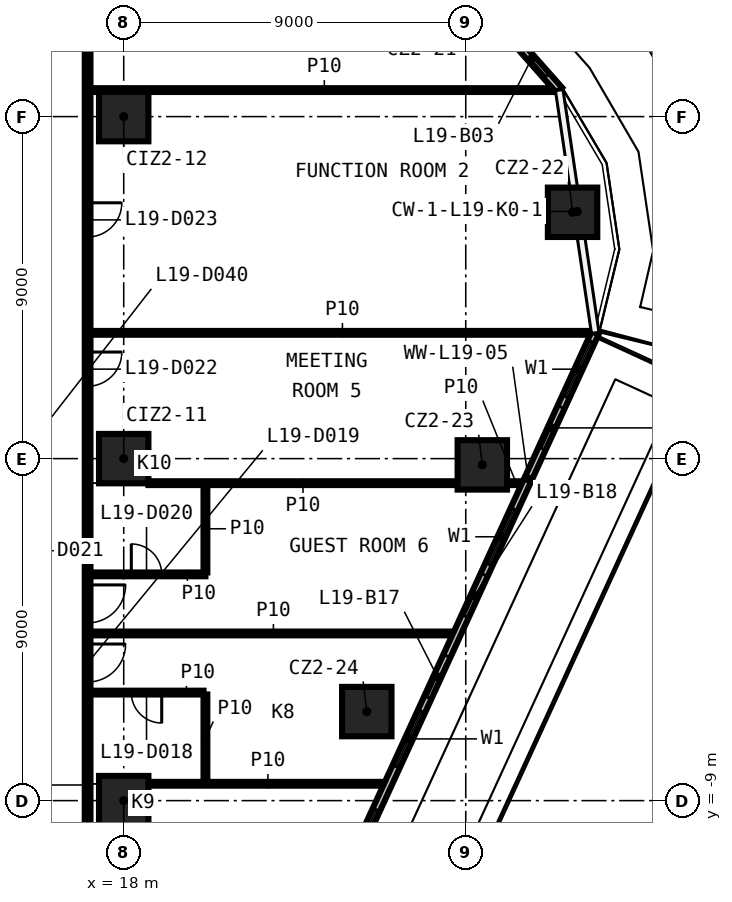
"""IFC4 building model, lengths in metres.
Left out: names, types, materials, properties, quantities, classifications, styles, units other than length and angle.
Written with IfcOpenShell. Run it as: python <this file> out.ifc"""

import sys

from ifc_helpers import new_model, si_unit, direction, frame, frame_2d, origin, origin_2d, place, context, subcontext, project, spatial, rectangle, extrude, element, fill, save


model = new_model("IFC4")
c1 = context("Model", 3, precision=1e-05, world=origin(), true_north=direction((0.0, 1.0)))
c2 = subcontext(c1, "Body", "Model", "MODEL_VIEW")
j1 = project(units=[si_unit("LENGTHUNIT", "METRE"), si_unit("PLANEANGLEUNIT", "RADIAN")], contexts=[c1])
p1 = place(None, origin())
s1 = spatial("IfcSite", under=j1, at=p1, CompositionType="ELEMENT")
p2 = place(p1, origin())
s2 = spatial("IfcBuilding", under=s1, at=p2, CompositionType="ELEMENT")
p3 = place(p2, frame((0.0, 0.0, 95.2)))
s3 = spatial("IfcBuildingStorey", under=s2, at=p3, CompositionType="ELEMENT", Elevation=95.2)
for number, where, z_axis, x_axis in (
    (1, (29.811, 6.482, 0.0), (0.0, 0.0, 1.0), (1.0, 0.0, 0.0)),
    (2, (27.436, -0.165, 0.0), (0.0, 0.0, 1.0), (1.0, 0.0, 0.0)),
    (3, (24.396, -6.657, 0.0), (0.0, 0.0, 1.0), (1.0, 0.0, 0.0)),
    (4, (18.0, -9.0, 0.0), (0.0, 0.0, 1.0), (1.0, 0.0, 0.0)),
    (5, (18.0, 0.0, 0.0), (0.0, 0.0, 1.0), (1.0, 0.0, 0.0)),
    (6, (18.0, 9.0, 0.0), (0.0, 0.0, 1.0), (1.0, 0.0, 0.0)),
):
    element("IfcColumn", number, at=place(p3, frame(where, z_axis=z_axis, x_axis=x_axis)), inside=s3, PredefinedType="COLUMN", context=c2, shape_type="SweptSolid", body=[
        extrude(rectangle(XDim=1.3, YDim=1.3, at=origin_2d()), origin(), (0.0, 0.0, 1.0), 3.25),
    ])
p4 = place(p3, frame((18.65, -8.557, 0.0), z_axis=(0.0, 0.0, 1.0), x_axis=(1.0, 0.0, 0.0)))
e7 = element("IfcWall", 7, at=p4, inside=s3, PredefinedType="PARTITIONING", context=c2, shape_type="SweptSolid", body=[
    extrude(rectangle(XDim=6.288, YDim=0.1, at=frame_2d((3.144, 0.0))), origin(), (0.0, 0.0, 1.0), 3.25),
])
p5 = place(p3, frame((20.1, -6.157, 0.0), z_axis=(0.0, 0.0, 1.0), x_axis=(-1.0, 0.0, 0.0)))
e8 = element("IfcWall", 8, at=p5, inside=s3, PredefinedType="PARTITIONING", context=c2, shape_type="SweptSolid", body=[
    extrude(rectangle(XDim=2.975, YDim=0.1, at=frame_2d((1.488, 0.0))), origin(), (0.0, 0.0, 1.0), 3.25),
])
p6 = place(p5, frame((1.1, 0.0, 0.0)))
e9 = element("IfcOpeningElement", 9, at=p6, cuts=e8, PredefinedType="OPENING", context=c2, shape_type="SweptSolid", body=[
    extrude(rectangle(XDim=0.8, YDim=2.1, at=frame_2d((0.4, 1.05))), frame((0.0, 0.06, 0.0), z_axis=(0.0, -1.0, 0.0), x_axis=(1.0, 0.0, 0.0)), (0.0, 0.0, 1.0), 0.12),
])
p7 = place(p3, frame((17.125, -4.601, 0.0), z_axis=(0.0, 0.0, 1.0), x_axis=(1.0, 0.0, 0.0)))
e10 = element("IfcWall", 10, at=p7, inside=s3, PredefinedType="PARTITIONING", context=c2, shape_type="SweptSolid", body=[
    extrude(rectangle(XDim=9.629, YDim=0.1, at=frame_2d((4.814, 0.0))), origin(), (0.0, 0.0, 1.0), 3.25),
])
p8 = place(p3, frame((17.125, -3.046, 0.0), z_axis=(0.0, 0.0, 1.0), x_axis=(1.0, 0.0, 0.0)))
e11 = element("IfcWall", 11, at=p8, inside=s3, PredefinedType="PARTITIONING", context=c2, shape_type="SweptSolid", body=[
    extrude(rectangle(XDim=3.025, YDim=0.1, at=frame_2d((1.512, 0.0))), origin(), (0.0, 0.0, 1.0), 3.25),
])
p9 = place(p8, frame((1.075, 0.0, 0.0)))
e12 = element("IfcOpeningElement", 12, at=p9, cuts=e11, PredefinedType="OPENING", context=c2, shape_type="SweptSolid", body=[
    extrude(rectangle(XDim=0.8, YDim=2.1, at=frame_2d((0.4, 1.05))), frame((0.0, 0.06, 0.0), z_axis=(0.0, -1.0, 0.0), x_axis=(1.0, 0.0, 0.0)), (0.0, 0.0, 1.0), 0.12),
])
p10 = place(p3, frame((18.65, -0.646, 0.0), z_axis=(0.0, 0.0, 1.0), x_axis=(1.0, 0.0, 0.0)))
e13 = element("IfcWall", 13, at=p10, inside=s3, PredefinedType="PARTITIONING", context=c2, shape_type="SweptSolid", body=[
    extrude(rectangle(XDim=8.136, YDim=0.1, at=frame_2d((4.068, 0.0))), origin(), (0.0, 0.0, 1.0), 3.25),
])
p11 = place(p3, frame((28.086, -0.646, 0.0), z_axis=(0.0, 0.0, 1.0), x_axis=(1.0, 0.0, 0.0)))
e14 = element("IfcWall", 14, at=p11, inside=s3, PredefinedType="PARTITIONING", context=c2, shape_type="SweptSolid", body=[
    extrude(rectangle(XDim=0.483, YDim=0.1, at=frame_2d((0.242, 0.0))), origin(), (0.0, 0.0, 1.0), 3.25),
])
p12 = place(p3, frame((17.125, 3.31, 0.0), z_axis=(0.0, 0.0, 1.0), x_axis=(1.0, 0.0, 0.0)))
e15 = element("IfcWall", 15, at=p12, inside=s3, PredefinedType="PARTITIONING", context=c2, shape_type="SweptSolid", body=[
    extrude(rectangle(XDim=13.26, YDim=0.1, at=frame_2d((6.63, 0.0))), origin(), (0.0, 0.0, 1.0), 3.25),
])
p13 = place(p3, frame((17.125, 9.698, 0.0), z_axis=(0.0, 0.0, 1.0), x_axis=(1.0, 0.0, 0.0)))
e16 = element("IfcWall", 16, at=p13, inside=s3, PredefinedType="PARTITIONING", context=c2, shape_type="SweptSolid", body=[
    extrude(rectangle(XDim=12.308, YDim=0.1, at=frame_2d((6.154, 0.0))), origin(), (0.0, 0.0, 1.0), 3.25),
])
p14 = place(p3, frame((20.15, -8.507, 0.0), z_axis=(0.0, 0.0, 1.0), x_axis=(0.0, 1.0, 0.0)))
e17 = element("IfcWall", 17, at=p14, inside=s3, PredefinedType="PARTITIONING", context=c2, shape_type="SweptSolid", body=[
    extrude(rectangle(XDim=2.3, YDim=0.1, at=frame_2d((1.15, 0.0))), origin(), (0.0, 0.0, 1.0), 3.25),
])
p15 = place(p3, frame((20.15, -2.996, 0.0), z_axis=(0.0, 0.0, 1.0), x_axis=(0.0, 1.0, 0.0)))
e18 = element("IfcWall", 18, at=p15, inside=s3, PredefinedType="PARTITIONING", context=c2, shape_type="SweptSolid", body=[
    extrude(rectangle(XDim=2.3, YDim=0.1, at=frame_2d((1.15, 0.0))), origin(), (0.0, 0.0, 1.0), 3.25),
])
p16 = place(p3, frame((17.05, 13.975, 0.0), z_axis=(0.0, 0.0, 1.0), x_axis=(0.0, -1.0, 0.0)))
e19 = element("IfcWall", 19, at=p16, inside=s3, PredefinedType="PARTITIONING", context=c2, shape_type="SweptSolid", body=[
    extrude(rectangle(XDim=27.95, YDim=0.15, at=frame_2d((13.975, 0.0))), origin(), (0.0, 0.0, 1.0), 3.25),
])
p17 = place(p16, frame((25.274, 0.0, 0.0)))
e20 = element("IfcOpeningElement", 20, at=p17, cuts=e19, PredefinedType="OPENING", context=c2, shape_type="SweptSolid", body=[
    extrude(rectangle(XDim=0.9, YDim=2.1, at=frame_2d((0.45, 1.05))), frame((0.0, 0.085, 0.0), z_axis=(0.0, -1.0, 0.0), x_axis=(1.0, 0.0, 0.0)), (0.0, 0.0, 1.0), 0.17),
])
p18 = place(p16, frame((18.854, 0.0, 0.0)))
e21 = element("IfcOpeningElement", 21, at=p18, cuts=e19, PredefinedType="OPENING", context=c2, shape_type="SweptSolid", body=[
    extrude(rectangle(XDim=1.0, YDim=2.1, at=frame_2d((0.5, 1.05))), frame((0.0, 0.085, 0.0), z_axis=(0.0, -1.0, 0.0), x_axis=(1.0, 0.0, 0.0)), (0.0, 0.0, 1.0), 0.17),
])
p19 = place(p16, frame((17.299, 0.0, 0.0)))
e22 = element("IfcOpeningElement", 22, at=p19, cuts=e19, PredefinedType="OPENING", context=c2, shape_type="SweptSolid", body=[
    extrude(rectangle(XDim=1.0, YDim=2.1, at=frame_2d((0.5, 1.05))), frame((0.0, 0.085, 0.0), z_axis=(0.0, -1.0, 0.0), x_axis=(1.0, 0.0, 0.0)), (0.0, 0.0, 1.0), 0.17),
])
p20 = place(p16, frame((11.171, 0.0, 0.0)))
e23 = element("IfcOpeningElement", 23, at=p20, cuts=e19, PredefinedType="OPENING", context=c2, shape_type="SweptSolid", body=[
    extrude(rectangle(XDim=0.9, YDim=2.1, at=frame_2d((0.45, 1.05))), frame((0.0, 0.085, 0.0), z_axis=(0.0, -1.0, 0.0), x_axis=(1.0, 0.0, 0.0)), (0.0, 0.0, 1.0), 0.17),
])
p21 = place(p16, frame((7.243, 0.0, 0.0)))
e24 = element("IfcOpeningElement", 24, at=p21, cuts=e19, PredefinedType="OPENING", context=c2, shape_type="SweptSolid", body=[
    extrude(rectangle(XDim=0.9, YDim=2.1, at=frame_2d((0.45, 1.05))), frame((0.0, 0.085, 0.0), z_axis=(0.0, -1.0, 0.0), x_axis=(1.0, 0.0, 0.0)), (0.0, 0.0, 1.0), 0.17),
])
p22 = place(p16, frame((2.153, 0.0, 0.0)))
e25 = element("IfcOpeningElement", 25, at=p22, cuts=e19, PredefinedType="OPENING", context=c2, shape_type="SweptSolid", body=[
    extrude(rectangle(XDim=0.9, YDim=2.1, at=frame_2d((0.45, 1.05))), frame((0.0, 0.085, 0.0), z_axis=(0.0, -1.0, 0.0), x_axis=(1.0, 0.0, 0.0)), (0.0, 0.0, 1.0), 0.17),
])
p23 = place(p3, frame((29.46, 9.698, 0.0), z_axis=(0.0, 0.0, 1.0), x_axis=(-0.662868291848, 0.748736020011, 0.0)))
e26 = element("IfcWall", 26, at=p23, inside=s3, PredefinedType="SOLIDWALL", context=c2, shape_type="SweptSolid", body=[
    extrude(rectangle(XDim=4.472, YDim=0.2, at=frame_2d((2.236, 0.0))), origin(), (0.0, 0.0, 1.0), 3.25),
])
p24 = place(p23, frame((2.0, 0.0, 0.6)))
e27 = element("IfcOpeningElement", 27, at=p24, cuts=e26, PredefinedType="OPENING", context=c2, shape_type="SweptSolid", body=[
    extrude(rectangle(XDim=1.6, YDim=2.4, at=frame_2d((0.8, 1.2))), frame((0.0, 0.11, 0.0), z_axis=(0.0, -1.0, 0.0), x_axis=(1.0, 0.0, 0.0)), (0.0, 0.0, 1.0), 0.22),
])
p25 = place(p23, frame((0.5, 0.0, 0.0)))
e28 = element("IfcOpeningElement", 28, at=p25, cuts=e26, PredefinedType="OPENING", context=c2, shape_type="SweptSolid", body=[
    extrude(rectangle(XDim=1.2, YDim=2.4, at=frame_2d((0.6, 1.2))), frame((0.0, 0.11, 0.0), z_axis=(0.0, -1.0, 0.0), x_axis=(1.0, 0.0, 0.0)), (0.0, 0.0, 1.0), 0.22),
])
p26 = place(p3, frame((21.329, -16.468, 0.0), z_axis=(0.0, 0.0, 1.0), x_axis=(0.417117833448, 0.908852415423, 0.0)))
e29 = element("IfcWall", 29, at=p26, inside=s3, PredefinedType="SOLIDWALL", context=c2, shape_type="SweptSolid", body=[
    extrude(rectangle(XDim=21.761, YDim=0.2, at=frame_2d((10.881, 0.0))), origin(), (0.0, 0.0, 1.0), 3.25),
])
p27 = place(p26, frame((2.0, 0.0, 0.6)))
e30 = element("IfcOpeningElement", 30, at=p27, cuts=e29, PredefinedType="OPENING", context=c2, shape_type="SweptSolid", body=[
    extrude(rectangle(XDim=1.6, YDim=2.4, at=frame_2d((0.8, 1.2))), frame((0.0, 0.11, 0.0), z_axis=(0.0, -1.0, 0.0), x_axis=(1.0, 0.0, 0.0)), (0.0, 0.0, 1.0), 0.22),
])
p28 = place(p26, frame((0.5, 0.0, 0.0)))
e31 = element("IfcOpeningElement", 31, at=p28, cuts=e29, PredefinedType="OPENING", context=c2, shape_type="SweptSolid", body=[
    extrude(rectangle(XDim=1.2, YDim=2.4, at=frame_2d((0.6, 1.2))), frame((0.0, 0.11, 0.0), z_axis=(0.0, -1.0, 0.0), x_axis=(1.0, 0.0, 0.0)), (0.0, 0.0, 1.0), 0.22),
])
p29 = place(p26, frame((6.352, 0.0, 0.6)))
e32 = element("IfcOpeningElement", 32, at=p29, cuts=e29, PredefinedType="OPENING", context=c2, shape_type="SweptSolid", body=[
    extrude(rectangle(XDim=1.6, YDim=2.4, at=frame_2d((0.8, 1.2))), frame((0.0, 0.11, 0.0), z_axis=(0.0, -1.0, 0.0), x_axis=(1.0, 0.0, 0.0)), (0.0, 0.0, 1.0), 0.22),
])
p30 = place(p26, frame((4.852, 0.0, 0.0)))
e33 = element("IfcOpeningElement", 33, at=p30, cuts=e29, PredefinedType="OPENING", context=c2, shape_type="SweptSolid", body=[
    extrude(rectangle(XDim=1.2, YDim=2.4, at=frame_2d((0.6, 1.2))), frame((0.0, 0.11, 0.0), z_axis=(0.0, -1.0, 0.0), x_axis=(1.0, 0.0, 0.0)), (0.0, 0.0, 1.0), 0.22),
])
p31 = place(p26, frame((9.205, 0.0, 0.6)))
e34 = element("IfcOpeningElement", 34, at=p31, cuts=e29, PredefinedType="OPENING", context=c2, shape_type="SweptSolid", body=[
    extrude(rectangle(XDim=1.6, YDim=2.4, at=frame_2d((0.8, 1.2))), frame((0.0, 0.11, 0.0), z_axis=(0.0, -1.0, 0.0), x_axis=(1.0, 0.0, 0.0)), (0.0, 0.0, 1.0), 0.22),
])
p32 = place(p26, frame((11.205, 0.0, 0.0)))
e35 = element("IfcOpeningElement", 35, at=p32, cuts=e29, PredefinedType="OPENING", context=c2, shape_type="SweptSolid", body=[
    extrude(rectangle(XDim=1.2, YDim=2.4, at=frame_2d((0.6, 1.2))), frame((0.0, 0.11, 0.0), z_axis=(0.0, -1.0, 0.0), x_axis=(1.0, 0.0, 0.0)), (0.0, 0.0, 1.0), 0.22),
])
p33 = place(p26, frame((15.057, 0.0, 0.6)))
e36 = element("IfcOpeningElement", 36, at=p33, cuts=e29, PredefinedType="OPENING", context=c2, shape_type="SweptSolid", body=[
    extrude(rectangle(XDim=1.6, YDim=2.4, at=frame_2d((0.8, 1.2))), frame((0.0, 0.11, 0.0), z_axis=(0.0, -1.0, 0.0), x_axis=(1.0, 0.0, 0.0)), (0.0, 0.0, 1.0), 0.22),
])
p34 = place(p26, frame((13.557, 0.0, 0.0)))
e37 = element("IfcOpeningElement", 37, at=p34, cuts=e29, PredefinedType="OPENING", context=c2, shape_type="SweptSolid", body=[
    extrude(rectangle(XDim=1.2, YDim=2.4, at=frame_2d((0.6, 1.2))), frame((0.0, 0.11, 0.0), z_axis=(0.0, -1.0, 0.0), x_axis=(1.0, 0.0, 0.0)), (0.0, 0.0, 1.0), 0.22),
])
p35 = place(p26, frame((19.909, 0.0, 0.6)))
e38 = element("IfcOpeningElement", 38, at=p35, cuts=e29, PredefinedType="OPENING", context=c2, shape_type="SweptSolid", body=[
    extrude(rectangle(XDim=1.6, YDim=2.4, at=frame_2d((0.8, 1.2))), frame((0.0, 0.11, 0.0), z_axis=(0.0, -1.0, 0.0), x_axis=(1.0, 0.0, 0.0)), (0.0, 0.0, 1.0), 0.22),
])
p36 = place(p26, frame((18.409, 0.0, 0.0)))
e39 = element("IfcOpeningElement", 39, at=p36, cuts=e29, PredefinedType="OPENING", context=c2, shape_type="SweptSolid", body=[
    extrude(rectangle(XDim=1.2, YDim=2.4, at=frame_2d((0.6, 1.2))), frame((0.0, 0.11, 0.0), z_axis=(0.0, -1.0, 0.0), x_axis=(1.0, 0.0, 0.0)), (0.0, 0.0, 1.0), 0.22),
])
p37 = place(p6, origin())
e40 = element("IfcDoor", 40, at=p37, inside=s3, OperationType="SINGLE_SWING_LEFT", PredefinedType="DOOR", context=c2, shape_type="SweptSolid", body=[
    extrude(rectangle(XDim=0.8, YDim=2.1, at=frame_2d((0.4, 1.05))), frame((0.0, 0.025, 0.0), z_axis=(0.0, -1.0, 0.0), x_axis=(1.0, 0.0, 0.0)), (0.0, 0.0, 1.0), 0.05),
])
fill(e9, e40)
p38 = place(p18, origin())
e41 = element("IfcDoor", 41, at=p38, inside=s3, OperationType="SINGLE_SWING_RIGHT", PredefinedType="DOOR", context=c2, shape_type="SweptSolid", body=[
    extrude(rectangle(XDim=1.0, YDim=2.1, at=frame_2d((0.5, 1.05))), frame((0.0, 0.025, 0.0), z_axis=(0.0, -1.0, 0.0), x_axis=(1.0, 0.0, 0.0)), (0.0, 0.0, 1.0), 0.05),
])
fill(e21, e41)
p39 = place(p9, origin())
e42 = element("IfcDoor", 42, at=p39, inside=s3, OperationType="SINGLE_SWING_RIGHT", PredefinedType="DOOR", context=c2, shape_type="SweptSolid", body=[
    extrude(rectangle(XDim=0.8, YDim=2.1, at=frame_2d((0.4, 1.05))), frame((0.0, 0.025, 0.0), z_axis=(0.0, -1.0, 0.0), x_axis=(1.0, 0.0, 0.0)), (0.0, 0.0, 1.0), 0.05),
])
fill(e12, e42)
p40 = place(p19, origin())
e43 = element("IfcDoor", 43, at=p40, inside=s3, OperationType="SINGLE_SWING_LEFT", PredefinedType="DOOR", context=c2, shape_type="SweptSolid", body=[
    extrude(rectangle(XDim=1.0, YDim=2.1, at=frame_2d((0.5, 1.05))), frame((0.0, 0.025, 0.0), z_axis=(0.0, -1.0, 0.0), x_axis=(1.0, 0.0, 0.0)), (0.0, 0.0, 1.0), 0.05),
])
fill(e22, e43)
p41 = place(p20, origin())
e44 = element("IfcDoor", 44, at=p41, inside=s3, OperationType="SINGLE_SWING_RIGHT", PredefinedType="DOOR", context=c2, shape_type="SweptSolid", body=[
    extrude(rectangle(XDim=0.9, YDim=2.1, at=frame_2d((0.45, 1.05))), frame((0.0, 0.025, 0.0), z_axis=(0.0, -1.0, 0.0), x_axis=(1.0, 0.0, 0.0)), (0.0, 0.0, 1.0), 0.05),
])
fill(e23, e44)
p42 = place(p21, origin())
e45 = element("IfcDoor", 45, at=p42, inside=s3, OperationType="SINGLE_SWING_LEFT", PredefinedType="DOOR", context=c2, shape_type="SweptSolid", body=[
    extrude(rectangle(XDim=0.9, YDim=2.1, at=frame_2d((0.45, 1.05))), frame((0.0, 0.025, 0.0), z_axis=(0.0, -1.0, 0.0), x_axis=(1.0, 0.0, 0.0)), (0.0, 0.0, 1.0), 0.05),
])
fill(e24, e45)
p43 = place(p25, origin())
e46 = element("IfcDoor", 46, at=p43, inside=s3, OperationType="SLIDING_TO_LEFT", PredefinedType="DOOR", context=c2, shape_type="SweptSolid", body=[
    extrude(rectangle(XDim=1.2, YDim=2.4, at=frame_2d((0.6, 1.2))), frame((0.0, 0.025, 0.0), z_axis=(0.0, -1.0, 0.0), x_axis=(1.0, 0.0, 0.0)), (0.0, 0.0, 1.0), 0.05),
])
fill(e28, e46)
p44 = place(p29, origin())
e47 = element("IfcWindow", 47, at=p44, inside=s3, PartitioningType="SINGLE_PANEL", PredefinedType="WINDOW", context=c2, shape_type="SweptSolid", body=[
    extrude(rectangle(XDim=1.6, YDim=2.4, at=frame_2d((0.8, 1.2))), frame((0.0, 0.03, 0.0), z_axis=(0.0, -1.0, 0.0), x_axis=(1.0, 0.0, 0.0)), (0.0, 0.0, 1.0), 0.06),
])
fill(e32, e47)
p45 = place(p31, origin())
e48 = element("IfcWindow", 48, at=p45, inside=s3, PartitioningType="SINGLE_PANEL", PredefinedType="WINDOW", context=c2, shape_type="SweptSolid", body=[
    extrude(rectangle(XDim=1.6, YDim=2.4, at=frame_2d((0.8, 1.2))), frame((0.0, 0.03, 0.0), z_axis=(0.0, -1.0, 0.0), x_axis=(1.0, 0.0, 0.0)), (0.0, 0.0, 1.0), 0.06),
])
fill(e34, e48)
p46 = place(p32, origin())
e49 = element("IfcDoor", 49, at=p46, inside=s3, OperationType="SLIDING_TO_LEFT", PredefinedType="DOOR", context=c2, shape_type="SweptSolid", body=[
    extrude(rectangle(XDim=1.2, YDim=2.4, at=frame_2d((0.6, 1.2))), frame((0.0, 0.025, 0.0), z_axis=(0.0, -1.0, 0.0), x_axis=(1.0, 0.0, 0.0)), (0.0, 0.0, 1.0), 0.05),
])
fill(e35, e49)
p47 = place(p33, origin())
e50 = element("IfcWindow", 50, at=p47, inside=s3, PartitioningType="SINGLE_PANEL", PredefinedType="WINDOW", context=c2, shape_type="SweptSolid", body=[
    extrude(rectangle(XDim=1.6, YDim=2.4, at=frame_2d((0.8, 1.2))), frame((0.0, 0.03, 0.0), z_axis=(0.0, -1.0, 0.0), x_axis=(1.0, 0.0, 0.0)), (0.0, 0.0, 1.0), 0.06),
])
fill(e36, e50)
p48 = place(p34, origin())
e51 = element("IfcDoor", 51, at=p48, inside=s3, OperationType="SLIDING_TO_LEFT", PredefinedType="DOOR", context=c2, shape_type="SweptSolid", body=[
    extrude(rectangle(XDim=1.2, YDim=2.4, at=frame_2d((0.6, 1.2))), frame((0.0, 0.025, 0.0), z_axis=(0.0, -1.0, 0.0), x_axis=(1.0, 0.0, 0.0)), (0.0, 0.0, 1.0), 0.05),
])
fill(e37, e51)
p49 = place(p35, origin())
e52 = element("IfcWindow", 52, at=p49, inside=s3, PartitioningType="SINGLE_PANEL", PredefinedType="WINDOW", context=c2, shape_type="SweptSolid", body=[
    extrude(rectangle(XDim=1.6, YDim=2.4, at=frame_2d((0.8, 1.2))), frame((0.0, 0.03, 0.0), z_axis=(0.0, -1.0, 0.0), x_axis=(1.0, 0.0, 0.0)), (0.0, 0.0, 1.0), 0.06),
])
fill(e38, e52)
p50 = place(p36, origin())
e53 = element("IfcDoor", 53, at=p50, inside=s3, OperationType="SLIDING_TO_LEFT", PredefinedType="DOOR", context=c2, shape_type="SweptSolid", body=[
    extrude(rectangle(XDim=1.2, YDim=2.4, at=frame_2d((0.6, 1.2))), frame((0.0, 0.025, 0.0), z_axis=(0.0, -1.0, 0.0), x_axis=(1.0, 0.0, 0.0)), (0.0, 0.0, 1.0), 0.05),
])
fill(e39, e53)
save(model, sys.argv[1])
